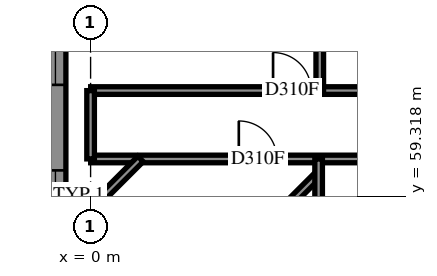
"""IFC4 building model, lengths in metres.
Left out: names, types, materials, properties, quantities, classifications, styles, units other than length and angle.
Written with IfcOpenShell. Run it as: python <this file> out.ifc"""

import sys

from ifc_helpers import new_model, si_unit, direction, frame, frame_2d, origin, place, context, subcontext, project, spatial, polyline, rectangle, outline, extrude, element, fill, save


model = new_model("IFC4")
c1 = context("Model", 3, precision=1e-05, world=origin(), true_north=direction((0.0, 1.0)))
c2 = subcontext(c1, "Body", "Model", "MODEL_VIEW")
j1 = project(units=[si_unit("LENGTHUNIT", "METRE"), si_unit("PLANEANGLEUNIT", "RADIAN")], contexts=[c1])
p1 = place(None, origin())
s1 = spatial("IfcSite", under=j1, at=p1, CompositionType="ELEMENT")
p2 = place(p1, origin())
s2 = spatial("IfcBuilding", under=s1, at=p2, CompositionType="ELEMENT")
p3 = place(p2, frame((0.0, 0.0, 14.4)))
s3 = spatial("IfcBuildingStorey", under=s2, at=p3, CompositionType="ELEMENT", Elevation=14.4)
p4 = place(p3, frame((-0.925, 71.725, 0.0), z_axis=(0.0, 0.0, 1.0), x_axis=(0.0, -1.0, 0.0)))
e1 = element("IfcWall", 1, at=p4, inside=s3, PredefinedType="SOLIDWALL", context=c2, shape_type="SweptSolid", body=[
    extrude(outline(polyline([(-0.275, -0.275), (28.525, -0.275), (27.975, 0.275), (0.275, 0.275), (-0.275, -0.275)])), origin(), (0.0, 0.0, 1.0), 3.8),
])
p5 = place(p4, frame((1.0, 0.0, 0.7)))
e2 = element("IfcOpeningElement", 2, at=p5, cuts=e1, PredefinedType="OPENING", context=c2, shape_type="SweptSolid", body=[
    extrude(rectangle(XDim=1.8, YDim=2.6, at=frame_2d((0.9, 1.3))), frame((0.0, 0.285, 0.0), z_axis=(0.0, -1.0, 0.0), x_axis=(1.0, 0.0, 0.0)), (0.0, 0.0, 1.0), 0.57),
])
p6 = place(p4, frame((4.225, 0.0, 0.7)))
e3 = element("IfcOpeningElement", 3, at=p6, cuts=e1, PredefinedType="OPENING", context=c2, shape_type="SweptSolid", body=[
    extrude(rectangle(XDim=1.8, YDim=2.6, at=frame_2d((0.9, 1.3))), frame((0.0, 0.285, 0.0), z_axis=(0.0, -1.0, 0.0), x_axis=(1.0, 0.0, 0.0)), (0.0, 0.0, 1.0), 0.57),
])
p7 = place(p4, frame((7.675, 0.0, 0.7)))
e4 = element("IfcOpeningElement", 4, at=p7, cuts=e1, PredefinedType="OPENING", context=c2, shape_type="SweptSolid", body=[
    extrude(rectangle(XDim=1.8, YDim=2.6, at=frame_2d((0.9, 1.3))), frame((0.0, 0.285, 0.0), z_axis=(0.0, -1.0, 0.0), x_axis=(1.0, 0.0, 0.0)), (0.0, 0.0, 1.0), 0.57),
])
p8 = place(p4, frame((14.875, 0.0, 0.7)))
e5 = element("IfcOpeningElement", 5, at=p8, cuts=e1, PredefinedType="OPENING", context=c2, shape_type="SweptSolid", body=[
    extrude(rectangle(XDim=1.8, YDim=2.6, at=frame_2d((0.9, 1.3))), frame((0.0, 0.285, 0.0), z_axis=(0.0, -1.0, 0.0), x_axis=(1.0, 0.0, 0.0)), (0.0, 0.0, 1.0), 0.57),
])
p9 = place(p4, frame((18.725, 0.0, 0.7)))
e6 = element("IfcOpeningElement", 6, at=p9, cuts=e1, PredefinedType="OPENING", context=c2, shape_type="SweptSolid", body=[
    extrude(rectangle(XDim=1.8, YDim=2.6, at=frame_2d((0.9, 1.3))), frame((0.0, 0.285, 0.0), z_axis=(0.0, -1.0, 0.0), x_axis=(1.0, 0.0, 0.0)), (0.0, 0.0, 1.0), 0.57),
])
p10 = place(p4, frame((21.625, 0.0, 0.7)))
e7 = element("IfcOpeningElement", 7, at=p10, cuts=e1, PredefinedType="OPENING", context=c2, shape_type="SweptSolid", body=[
    extrude(rectangle(XDim=1.8, YDim=2.6, at=frame_2d((0.9, 1.3))), frame((0.0, 0.285, 0.0), z_axis=(0.0, -1.0, 0.0), x_axis=(1.0, 0.0, 0.0)), (0.0, 0.0, 1.0), 0.57),
])
p11 = place(p4, frame((25.45, 0.0, 0.7)))
e8 = element("IfcOpeningElement", 8, at=p11, cuts=e1, PredefinedType="OPENING", context=c2, shape_type="SweptSolid", body=[
    extrude(rectangle(XDim=1.8, YDim=2.6, at=frame_2d((0.9, 1.3))), frame((0.0, 0.285, 0.0), z_axis=(0.0, -1.0, 0.0), x_axis=(1.0, 0.0, 0.0)), (0.0, 0.0, 1.0), 0.57),
])
p12 = place(p4, frame((11.725, 0.0, 0.45)))
e9 = element("IfcOpeningElement", 9, at=p12, cuts=e1, PredefinedType="OPENING", context=c2, shape_type="SweptSolid", body=[
    extrude(rectangle(XDim=1.3, YDim=2.5, at=frame_2d((0.65, 1.25))), frame((0.0, 0.285, 0.0), z_axis=(0.0, -1.0, 0.0), x_axis=(1.0, 0.0, 0.0)), (0.0, 0.0, 1.0), 0.57),
])
p13 = place(p3, frame((0.002, 60.3, 0.0), z_axis=(0.0, 0.0, 1.0), x_axis=(1.0, 0.0, 0.0)))
e10 = element("IfcWall", 10, at=p13, inside=s3, PredefinedType="PARTITIONING", context=c2, shape_type="SweptSolid", body=[
    extrude(rectangle(XDim=54.798, YDim=0.2, at=frame_2d((27.399, 0.0))), origin(), (0.0, 0.0, 1.0), 3.8),
])
p14 = place(p13, frame((18.261, 0.0, 0.0)))
e11 = element("IfcOpeningElement", 11, at=p14, cuts=e10, PredefinedType="OPENING", context=c2, shape_type="SweptSolid", body=[
    extrude(rectangle(XDim=1.0, YDim=2.1, at=frame_2d((0.5, 1.05))), frame((0.0, 0.11, 0.0), z_axis=(0.0, -1.0, 0.0), x_axis=(1.0, 0.0, 0.0)), (0.0, 0.0, 1.0), 0.22),
])
p15 = place(p13, frame((27.256, 0.0, 0.0)))
e12 = element("IfcOpeningElement", 12, at=p15, cuts=e10, PredefinedType="OPENING", context=c2, shape_type="SweptSolid", body=[
    extrude(rectangle(XDim=1.0, YDim=2.1, at=frame_2d((0.5, 1.05))), frame((0.0, 0.11, 0.0), z_axis=(0.0, -1.0, 0.0), x_axis=(1.0, 0.0, 0.0)), (0.0, 0.0, 1.0), 0.22),
])
p16 = place(p13, frame((36.54, 0.0, 0.0)))
e13 = element("IfcOpeningElement", 13, at=p16, cuts=e10, PredefinedType="OPENING", context=c2, shape_type="SweptSolid", body=[
    extrude(rectangle(XDim=1.0, YDim=2.1, at=frame_2d((0.5, 1.05))), frame((0.0, 0.11, 0.0), z_axis=(0.0, -1.0, 0.0), x_axis=(1.0, 0.0, 0.0)), (0.0, 0.0, 1.0), 0.22),
])
p17 = place(p13, frame((47.06, 0.0, 0.0)))
e14 = element("IfcOpeningElement", 14, at=p17, cuts=e10, PredefinedType="OPENING", context=c2, shape_type="SweptSolid", body=[
    extrude(rectangle(XDim=1.0, YDim=2.1, at=frame_2d((0.5, 1.05))), frame((0.0, 0.11, 0.0), z_axis=(0.0, -1.0, 0.0), x_axis=(1.0, 0.0, 0.0)), (0.0, 0.0, 1.0), 0.22),
])
p18 = place(p13, frame((3.898, 0.0, 0.0)))
e15 = element("IfcOpeningElement", 15, at=p18, cuts=e10, PredefinedType="OPENING", context=c2, shape_type="SweptSolid", body=[
    extrude(rectangle(XDim=1.0, YDim=2.1, at=frame_2d((0.5, 1.05))), frame((0.0, 0.11, 0.0), z_axis=(0.0, -1.0, 0.0), x_axis=(1.0, 0.0, 0.0)), (0.0, 0.0, 1.0), 0.22),
])
p19 = place(p3, frame((0.002, 62.1, 0.0), z_axis=(0.0, 0.0, 1.0), x_axis=(1.0, 0.0, 0.0)))
e16 = element("IfcWall", 16, at=p19, inside=s3, PredefinedType="PARTITIONING", context=c2, shape_type="SweptSolid", body=[
    extrude(rectangle(XDim=54.798, YDim=0.2, at=frame_2d((27.399, 0.0))), origin(), (0.0, 0.0, 1.0), 3.8),
])
p20 = place(p19, frame((8.667, 0.0, 0.0)))
e17 = element("IfcOpeningElement", 17, at=p20, cuts=e16, PredefinedType="OPENING", context=c2, shape_type="SweptSolid", body=[
    extrude(rectangle(XDim=1.0, YDim=2.1, at=frame_2d((0.5, 1.05))), frame((0.0, 0.11, 0.0), z_axis=(0.0, -1.0, 0.0), x_axis=(1.0, 0.0, 0.0)), (0.0, 0.0, 1.0), 0.22),
])
p21 = place(p19, frame((13.136, 0.0, 0.0)))
e18 = element("IfcOpeningElement", 18, at=p21, cuts=e16, PredefinedType="OPENING", context=c2, shape_type="SweptSolid", body=[
    extrude(rectangle(XDim=1.0, YDim=2.1, at=frame_2d((0.5, 1.05))), frame((0.0, 0.11, 0.0), z_axis=(0.0, -1.0, 0.0), x_axis=(1.0, 0.0, 0.0)), (0.0, 0.0, 1.0), 0.22),
])
p22 = place(p19, frame((20.335, 0.0, 0.0)))
e19 = element("IfcOpeningElement", 19, at=p22, cuts=e16, PredefinedType="OPENING", context=c2, shape_type="SweptSolid", body=[
    extrude(rectangle(XDim=1.0, YDim=2.1, at=frame_2d((0.5, 1.05))), frame((0.0, 0.11, 0.0), z_axis=(0.0, -1.0, 0.0), x_axis=(1.0, 0.0, 0.0)), (0.0, 0.0, 1.0), 0.22),
])
p23 = place(p19, frame((27.535, 0.0, 0.0)))
e20 = element("IfcOpeningElement", 20, at=p23, cuts=e16, PredefinedType="OPENING", context=c2, shape_type="SweptSolid", body=[
    extrude(rectangle(XDim=1.0, YDim=2.1, at=frame_2d((0.5, 1.05))), frame((0.0, 0.11, 0.0), z_axis=(0.0, -1.0, 0.0), x_axis=(1.0, 0.0, 0.0)), (0.0, 0.0, 1.0), 0.22),
])
p24 = place(p19, frame((34.736, 0.0, 0.0)))
e21 = element("IfcOpeningElement", 21, at=p24, cuts=e16, PredefinedType="OPENING", context=c2, shape_type="SweptSolid", body=[
    extrude(rectangle(XDim=1.0, YDim=2.1, at=frame_2d((0.5, 1.05))), frame((0.0, 0.11, 0.0), z_axis=(0.0, -1.0, 0.0), x_axis=(1.0, 0.0, 0.0)), (0.0, 0.0, 1.0), 0.22),
])
p25 = place(p19, frame((41.935, 0.0, 0.0)))
e22 = element("IfcOpeningElement", 22, at=p25, cuts=e16, PredefinedType="OPENING", context=c2, shape_type="SweptSolid", body=[
    extrude(rectangle(XDim=1.0, YDim=2.1, at=frame_2d((0.5, 1.05))), frame((0.0, 0.11, 0.0), z_axis=(0.0, -1.0, 0.0), x_axis=(1.0, 0.0, 0.0)), (0.0, 0.0, 1.0), 0.22),
])
p26 = place(p19, frame((49.136, 0.0, 0.0)))
e23 = element("IfcOpeningElement", 23, at=p26, cuts=e16, PredefinedType="OPENING", context=c2, shape_type="SweptSolid", body=[
    extrude(rectangle(XDim=1.0, YDim=2.1, at=frame_2d((0.5, 1.05))), frame((0.0, 0.11, 0.0), z_axis=(0.0, -1.0, 0.0), x_axis=(1.0, 0.0, 0.0)), (0.0, 0.0, 1.0), 0.22),
])
p27 = place(p19, frame((4.799, 0.0, 0.0)))
e24 = element("IfcOpeningElement", 24, at=p27, cuts=e16, PredefinedType="OPENING", context=c2, shape_type="SweptSolid", body=[
    extrude(rectangle(XDim=1.0, YDim=2.1, at=frame_2d((0.5, 1.05))), frame((0.0, 0.11, 0.0), z_axis=(0.0, -1.0, 0.0), x_axis=(1.0, 0.0, 0.0)), (0.0, 0.0, 1.0), 0.22),
])
p28 = place(p3, frame((6.03, 62.1, 0.0), z_axis=(0.0, 0.0, 1.0), x_axis=(0.0, 1.0, 0.0)))
e25 = element("IfcWall", 25, at=p28, inside=s3, PredefinedType="PARTITIONING", context=c2, shape_type="SweptSolid", body=[
    extrude(rectangle(XDim=10.55, YDim=0.2, at=frame_2d((5.275, 0.0))), origin(), (0.0, 0.0, 1.0), 3.8),
])
p29 = place(p3, frame((1.005, 54.901, 0.0), z_axis=(0.0, 0.0, 1.0), x_axis=(0.7071067812, 0.7071067812, 0.0)))
e26 = element("IfcWall", 26, at=p29, inside=s3, PredefinedType="PARTITIONING", context=c2, shape_type="SweptSolid", body=[
    extrude(rectangle(XDim=7.063, YDim=0.2, at=frame_2d((3.531, 0.0))), origin(), (0.0, 0.0, 1.0), 3.8),
])
p30 = place(p3, frame((6.0, 54.9, 0.0), z_axis=(0.0, 0.0, 1.0), x_axis=(0.0, 1.0, 0.0)))
e27 = element("IfcWall", 27, at=p30, inside=s3, PredefinedType="PARTITIONING", context=c2, shape_type="SweptSolid", body=[
    extrude(rectangle(XDim=5.4, YDim=0.2, at=frame_2d((2.7, 0.0))), origin(), (0.0, 0.0, 1.0), 3.8),
])
p31 = place(p3, frame((-0.65, 58.337, 0.0), z_axis=(0.0, 0.0, 1.0), x_axis=(0.7071067812, 0.7071067812, 0.0)))
e28 = element("IfcWall", 28, at=p31, inside=s3, PredefinedType="PARTITIONING", context=c2, shape_type="SweptSolid", body=[
    extrude(rectangle(XDim=2.777, YDim=0.2, at=frame_2d((1.388, 0.0))), origin(), (0.0, 0.0, 1.0), 3.8),
])
p32 = place(p3, frame((0.0, 60.302, 0.0), z_axis=(0.0, 0.0, 1.0), x_axis=(0.0, 1.0, 0.0)))
e29 = element("IfcWall", 29, at=p32, inside=s3, PredefinedType="PARTITIONING", context=c2, shape_type="SweptSolid", body=[
    extrude(rectangle(XDim=1.796, YDim=0.2, at=frame_2d((0.898, 0.0))), origin(), (0.0, 0.0, 1.0), 3.2),
])
p33 = place(p7, origin())
e30 = element("IfcWindow", 30, at=p33, inside=s3, PartitioningType="SINGLE_PANEL", PredefinedType="WINDOW", context=c2, shape_type="SweptSolid", body=[
    extrude(rectangle(XDim=1.8, YDim=2.6, at=frame_2d((0.9, 1.3))), frame((0.0, 0.155, 0.0), z_axis=(0.0, -1.0, 0.0), x_axis=(1.0, 0.0, 0.0)), (0.0, 0.0, 1.0), 0.06),
])
fill(e4, e30)
p34 = place(p27, origin())
e31 = element("IfcDoor", 31, at=p34, inside=s3, OperationType="SINGLE_SWING_LEFT", PredefinedType="DOOR", context=c2, shape_type="SweptSolid", body=[
    extrude(rectangle(XDim=1.0, YDim=2.1, at=frame_2d((0.5, 1.05))), frame((0.0, 0.025, 0.0), z_axis=(0.0, -1.0, 0.0), x_axis=(1.0, 0.0, 0.0)), (0.0, 0.0, 1.0), 0.05),
])
fill(e24, e31)
p35 = place(p18, origin())
e32 = element("IfcDoor", 32, at=p35, inside=s3, OperationType="SINGLE_SWING_LEFT", PredefinedType="DOOR", context=c2, shape_type="SweptSolid", body=[
    extrude(rectangle(XDim=1.0, YDim=2.1, at=frame_2d((0.5, 1.05))), frame((0.0, 0.025, 0.0), z_axis=(0.0, -1.0, 0.0), x_axis=(1.0, 0.0, 0.0)), (0.0, 0.0, 1.0), 0.05),
])
fill(e15, e32)
p36 = place(p12, origin())
e33 = element("IfcWindow", 33, at=p36, inside=s3, PartitioningType="SINGLE_PANEL", PredefinedType="WINDOW", context=c2, shape_type="SweptSolid", body=[
    extrude(rectangle(XDim=1.3, YDim=2.5, at=frame_2d((0.65, 1.25))), frame((0.0, 0.155, 0.0), z_axis=(0.0, -1.0, 0.0), x_axis=(1.0, 0.0, 0.0)), (0.0, 0.0, 1.0), 0.06),
])
fill(e9, e33)
save(model, sys.argv[1])
